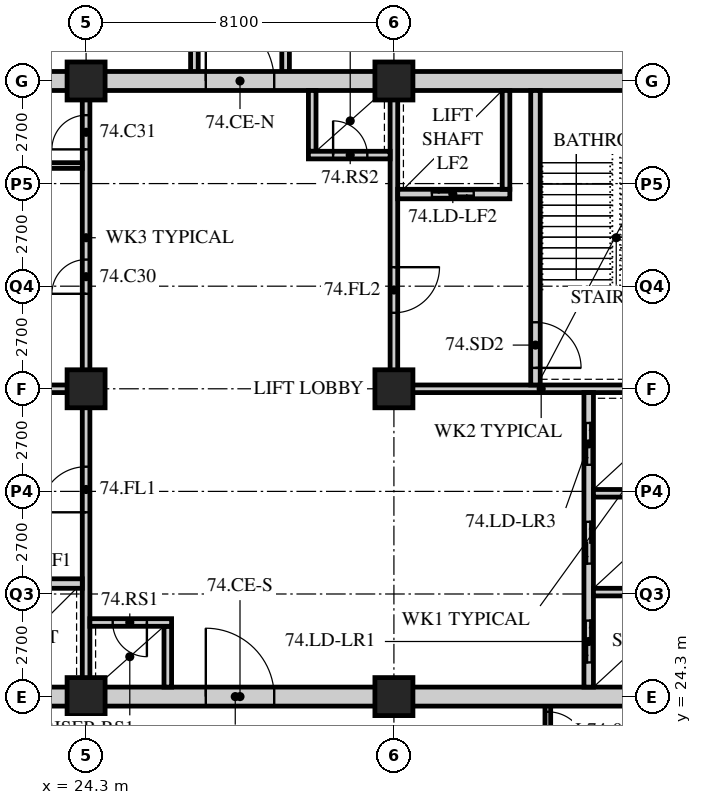
"""IFC4 building model, lengths in metres.
Left out: names, types, materials, properties, quantities, classifications, styles, units other than length and angle.
Written with IfcOpenShell. Run it as: python <this file> out.ifc"""

import sys

from ifc_helpers import new_model, si_unit, direction, frame, frame_2d, origin, origin_2d, place, context, subcontext, project, spatial, rectangle, hollow_rectangle, extrude, element, fill, save


model = new_model("IFC4")
c1 = context("Model", 3, precision=1e-05, world=origin(), true_north=direction((0.0, 1.0)))
c2 = subcontext(c1, "Body", "Model", "MODEL_VIEW")
j1 = project(units=[si_unit("LENGTHUNIT", "METRE"), si_unit("PLANEANGLEUNIT", "RADIAN")], contexts=[c1])
p1 = place(None, origin())
s1 = spatial("IfcSite", under=j1, at=p1, CompositionType="ELEMENT")
p2 = place(p1, origin())
s2 = spatial("IfcBuilding", under=s1, at=p2, CompositionType="ELEMENT")
p3 = place(p2, frame((0.0, 0.0, 289.2)))
s3 = spatial("IfcBuildingStorey", under=s2, at=p3, CompositionType="ELEMENT", Elevation=289.2)
for number, where, z_axis, x_axis in (
    (1, (24.3, 24.3, 0.0), (0.0, 0.0, 1.0), (1.0, 0.0, 0.0)),
    (2, (24.3, 32.4, 0.0), (0.0, 0.0, 1.0), (1.0, 0.0, 0.0)),
    (3, (24.3, 40.5, 0.0), (0.0, 0.0, 1.0), (1.0, 0.0, 0.0)),
    (4, (32.4, 24.3, 0.0), (0.0, 0.0, 1.0), (1.0, 0.0, 0.0)),
    (5, (32.4, 32.4, 0.0), (0.0, 0.0, 1.0), (1.0, 0.0, 0.0)),
    (6, (32.4, 40.5, 0.0), (0.0, 0.0, 1.0), (1.0, 0.0, 0.0)),
):
    element("IfcColumn", number, at=place(p3, frame(where, z_axis=z_axis, x_axis=x_axis)), inside=s3, PredefinedType="COLUMN", context=c2, shape_type="SweptSolid", body=[
        extrude(hollow_rectangle(XDim=1.0, YDim=1.0, WallThickness=0.1, at=origin_2d()), origin(), (0.0, 0.0, 1.0), 3.9),
    ])
for number, where, z_axis, x_axis in (
    (7, (27.15, 40.5, 0.0), (0.0, 0.0, 1.0), (0.0, 1.0, 0.0)),
    (8, (29.55, 40.5, 0.0), (0.0, 0.0, 1.0), (0.0, 1.0, 0.0)),
):
    element("IfcWall", number, at=place(p3, frame(where, z_axis=z_axis, x_axis=x_axis)), inside=s3, PredefinedType="SOLIDWALL", context=c2, shape_type="SweptSolid", body=[
        extrude(rectangle(XDim=6.3, YDim=0.2, at=frame_2d((3.15, 0.0))), origin(), (0.0, 0.0, 1.0), 3.69),
    ])
p4 = place(p3, frame((36.45, 22.5, 0.0), z_axis=(0.0, 0.0, 1.0), x_axis=(0.0, 1.0, 0.0)))
e9 = element("IfcWall", 9, at=p4, inside=s3, PredefinedType="PARTITIONING", context=c2, shape_type="SweptSolid", body=[
    extrude(rectangle(XDim=1.8, YDim=0.15, at=frame_2d((0.9, 0.0))), origin(), (0.0, 0.0, 1.0), 3.69),
])
p5 = place(p4, frame((0.4, 0.0, 0.0)))
e10 = element("IfcOpeningElement", 10, at=p5, cuts=e9, PredefinedType="OPENING", context=c2, shape_type="SweptSolid", body=[
    extrude(rectangle(XDim=1.0, YDim=2.1, at=frame_2d((0.5, 1.05))), frame((0.0, 0.085, 0.0), z_axis=(0.0, -1.0, 0.0), x_axis=(1.0, 0.0, 0.0)), (0.0, 0.0, 1.0), 0.17),
])
p6 = place(p3, frame((15.95, 24.3, 0.0), z_axis=(0.0, 0.0, 1.0), x_axis=(1.0, 0.0, 0.0)))
e11 = element("IfcWall", 11, at=p6, inside=s3, PredefinedType="SOLIDWALL", context=c2, shape_type="SweptSolid", body=[
    extrude(rectangle(XDim=24.55, YDim=0.5, at=frame_2d((12.275, 0.0))), origin(), (0.0, 0.0, 1.0), 3.04),
])
p7 = place(p6, frame((11.5, 0.0, 0.0)))
e12 = element("IfcOpeningElement", 12, at=p7, cuts=e11, PredefinedType="OPENING", context=c2, shape_type="SweptSolid", body=[
    extrude(rectangle(XDim=1.8, YDim=2.4, at=frame_2d((0.9, 1.2))), frame((0.0, 0.26, 0.0), z_axis=(0.0, -1.0, 0.0), x_axis=(1.0, 0.0, 0.0)), (0.0, 0.0, 1.0), 0.52),
])
p8 = place(p3, frame((15.95, 40.5, 0.0), z_axis=(0.0, 0.0, 1.0), x_axis=(1.0, 0.0, 0.0)))
e13 = element("IfcWall", 13, at=p8, inside=s3, PredefinedType="SOLIDWALL", context=c2, shape_type="SweptSolid", body=[
    extrude(rectangle(XDim=24.55, YDim=0.5, at=frame_2d((12.275, 0.0))), origin(), (0.0, 0.0, 1.0), 3.04),
])
p9 = place(p8, frame((11.5, 0.0, 0.0)))
e14 = element("IfcOpeningElement", 14, at=p9, cuts=e13, PredefinedType="OPENING", context=c2, shape_type="SweptSolid", body=[
    extrude(rectangle(XDim=1.8, YDim=2.4, at=frame_2d((0.9, 1.2))), frame((0.0, 0.26, 0.0), z_axis=(0.0, -1.0, 0.0), x_axis=(1.0, 0.0, 0.0)), (0.0, 0.0, 1.0), 0.52),
])
p10 = place(p3, frame((16.45, 32.4, 0.0), z_axis=(0.0, 0.0, 1.0), x_axis=(1.0, 0.0, 0.0)))
e15 = element("IfcWall", 15, at=p10, inside=s3, PredefinedType="SOLIDWALL", context=c2, shape_type="SweptSolid", body=[
    extrude(rectangle(XDim=7.95, YDim=0.2, at=frame_2d((3.975, 0.0))), origin(), (0.0, 0.0, 1.0), 3.078),
])
p11 = place(p3, frame((24.3, 24.55, 0.0), z_axis=(0.0, 0.0, 1.0), x_axis=(0.0, 1.0, 0.0)))
e16 = element("IfcWall", 16, at=p11, inside=s3, PredefinedType="SOLIDWALL", context=c2, shape_type="SweptSolid", body=[
    extrude(rectangle(XDim=7.75, YDim=0.2, at=frame_2d((3.875, 0.0))), origin(), (0.0, 0.0, 1.0), 3.078),
])
p12 = place(p11, frame((4.6, 0.0, 0.0)))
e17 = element("IfcOpeningElement", 17, at=p12, cuts=e16, PredefinedType="OPENING", context=c2, shape_type="SweptSolid", body=[
    extrude(rectangle(XDim=1.2, YDim=2.1, at=frame_2d((0.6, 1.05))), frame((0.0, 0.11, 0.0), z_axis=(0.0, -1.0, 0.0), x_axis=(1.0, 0.0, 0.0)), (0.0, 0.0, 1.0), 0.22),
])
p13 = place(p3, frame((21.25, 27.275, 0.0), z_axis=(0.0, 0.0, 1.0), x_axis=(1.0, 0.0, 0.0)))
e18 = element("IfcWall", 18, at=p13, inside=s3, PredefinedType="SOLIDWALL", context=c2, shape_type="SweptSolid", body=[
    extrude(rectangle(XDim=2.95, YDim=0.25, at=frame_2d((1.475, 0.0))), origin(), (0.0, 0.0, 1.0), 3.69),
])
p14 = place(p13, frame((0.95, 0.0, 0.0)))
e19 = element("IfcOpeningElement", 19, at=p14, cuts=e18, PredefinedType="OPENING", context=c2, shape_type="SweptSolid", body=[
    extrude(rectangle(XDim=1.1, YDim=2.4, at=frame_2d((0.55, 1.2))), frame((0.0, 0.135, 0.0), z_axis=(0.0, -1.0, 0.0), x_axis=(1.0, 0.0, 0.0)), (0.0, 0.0, 1.0), 0.27),
])
p15 = place(p3, frame((26.45, 24.55, 0.0), z_axis=(0.0, 0.0, 1.0), x_axis=(0.0, 1.0, 0.0)))
e20 = element("IfcWall", 20, at=p15, inside=s3, PredefinedType="SOLIDWALL", context=c2, shape_type="SweptSolid", body=[
    extrude(rectangle(XDim=1.6, YDim=0.2, at=frame_2d((0.8, 0.0))), origin(), (0.0, 0.0, 1.0), 3.69),
])
p16 = place(p3, frame((24.4, 26.25, 0.0), z_axis=(0.0, 0.0, 1.0), x_axis=(1.0, 0.0, 0.0)))
e21 = element("IfcWall", 21, at=p16, inside=s3, PredefinedType="SOLIDWALL", context=c2, shape_type="SweptSolid", body=[
    extrude(rectangle(XDim=2.15, YDim=0.2, at=frame_2d((1.075, 0.0))), origin(), (0.0, 0.0, 1.0), 3.69),
])
p17 = place(p16, frame((0.6, 0.0, 0.0)))
e22 = element("IfcOpeningElement", 22, at=p17, cuts=e21, PredefinedType="OPENING", context=c2, shape_type="SweptSolid", body=[
    extrude(rectangle(XDim=0.9, YDim=2.1, at=frame_2d((0.45, 1.05))), frame((0.0, 0.11, 0.0), z_axis=(0.0, -1.0, 0.0), x_axis=(1.0, 0.0, 0.0)), (0.0, 0.0, 1.0), 0.22),
])
p18 = place(p3, frame((32.3, 32.4, 0.0), z_axis=(0.0, 0.0, 1.0), x_axis=(1.0, 0.0, 0.0)))
e23 = element("IfcWall", 23, at=p18, inside=s3, PredefinedType="SOLIDWALL", context=c2, shape_type="SweptSolid", body=[
    extrude(rectangle(XDim=7.95, YDim=0.2, at=frame_2d((3.975, 0.0))), origin(), (0.0, 0.0, 1.0), 3.078),
])
p19 = place(p3, frame((32.4, 32.5, 0.0), z_axis=(0.0, 0.0, 1.0), x_axis=(0.0, 1.0, 0.0)))
e24 = element("IfcWall", 24, at=p19, inside=s3, PredefinedType="SOLIDWALL", context=c2, shape_type="SweptSolid", body=[
    extrude(rectangle(XDim=7.75, YDim=0.2, at=frame_2d((3.875, 0.0))), origin(), (0.0, 0.0, 1.0), 3.078),
])
p20 = place(p19, frame((1.9, 0.0, 0.0)))
e25 = element("IfcOpeningElement", 25, at=p20, cuts=e24, PredefinedType="OPENING", context=c2, shape_type="SweptSolid", body=[
    extrude(rectangle(XDim=1.2, YDim=2.1, at=frame_2d((0.6, 1.05))), frame((0.0, 0.11, 0.0), z_axis=(0.0, -1.0, 0.0), x_axis=(1.0, 0.0, 0.0)), (0.0, 0.0, 1.0), 0.22),
])
p21 = place(p3, frame((37.525, 24.55, 0.0), z_axis=(0.0, 0.0, 1.0), x_axis=(0.0, 1.0, 0.0)))
e26 = element("IfcWall", 26, at=p21, inside=s3, PredefinedType="SOLIDWALL", context=c2, shape_type="SweptSolid", body=[
    extrude(rectangle(XDim=7.75, YDim=0.25, at=frame_2d((3.875, 0.0))), origin(), (0.0, 0.0, 1.0), 3.69),
])
p22 = place(p21, frame((0.65, 0.0, 0.0)))
e27 = element("IfcOpeningElement", 27, at=p22, cuts=e26, PredefinedType="OPENING", context=c2, shape_type="SweptSolid", body=[
    extrude(rectangle(XDim=1.1, YDim=2.4, at=frame_2d((0.55, 1.2))), frame((0.0, 0.135, 0.0), z_axis=(0.0, -1.0, 0.0), x_axis=(1.0, 0.0, 0.0)), (0.0, 0.0, 1.0), 0.27),
])
p23 = place(p21, frame((3.25, 0.0, 0.0)))
e28 = element("IfcOpeningElement", 28, at=p23, cuts=e26, PredefinedType="OPENING", context=c2, shape_type="SweptSolid", body=[
    extrude(rectangle(XDim=1.1, YDim=2.4, at=frame_2d((0.55, 1.2))), frame((0.0, 0.135, 0.0), z_axis=(0.0, -1.0, 0.0), x_axis=(1.0, 0.0, 0.0)), (0.0, 0.0, 1.0), 0.27),
])
p24 = place(p21, frame((5.85, 0.0, 0.0)))
e29 = element("IfcOpeningElement", 29, at=p24, cuts=e26, PredefinedType="OPENING", context=c2, shape_type="SweptSolid", body=[
    extrude(rectangle(XDim=1.1, YDim=2.4, at=frame_2d((0.55, 1.2))), frame((0.0, 0.135, 0.0), z_axis=(0.0, -1.0, 0.0), x_axis=(1.0, 0.0, 0.0)), (0.0, 0.0, 1.0), 0.27),
])
for number, where, z_axis, x_axis in (
    (30, (37.65, 27.05, 0.0), (0.0, 0.0, 1.0), (1.0, 0.0, 0.0)),
    (31, (37.65, 29.65, 0.0), (0.0, 0.0, 1.0), (1.0, 0.0, 0.0)),
):
    element("IfcWall", number, at=place(p3, frame(where, z_axis=z_axis, x_axis=x_axis)), inside=s3, PredefinedType="SOLIDWALL", context=c2, shape_type="SweptSolid", body=[
        extrude(rectangle(XDim=2.6, YDim=0.2, at=frame_2d((1.3, 0.0))), origin(), (0.0, 0.0, 1.0), 3.69),
    ])
p25 = place(p3, frame((36.125, 32.5, 0.0), z_axis=(0.0, 0.0, 1.0), x_axis=(0.0, 1.0, 0.0)))
e32 = element("IfcWall", 32, at=p25, inside=s3, PredefinedType="SOLIDWALL", context=c2, shape_type="SweptSolid", body=[
    extrude(rectangle(XDim=7.75, YDim=0.25, at=frame_2d((3.875, 0.0))), origin(), (0.0, 0.0, 1.0), 3.69),
])
p26 = place(p25, frame((0.45, 0.0, 0.0)))
e33 = element("IfcOpeningElement", 33, at=p26, cuts=e32, PredefinedType="OPENING", context=c2, shape_type="SweptSolid", body=[
    extrude(rectangle(XDim=1.2, YDim=2.1, at=frame_2d((0.6, 1.05))), frame((0.0, 0.135, 0.0), z_axis=(0.0, -1.0, 0.0), x_axis=(1.0, 0.0, 0.0)), (0.0, 0.0, 1.0), 0.27),
])
p27 = place(p3, frame((32.5, 37.525, 0.0), z_axis=(0.0, 0.0, 1.0), x_axis=(1.0, 0.0, 0.0)))
e34 = element("IfcWall", 34, at=p27, inside=s3, PredefinedType="SOLIDWALL", context=c2, shape_type="SweptSolid", body=[
    extrude(rectangle(XDim=2.95, YDim=0.25, at=frame_2d((1.475, 0.0))), origin(), (0.0, 0.0, 1.0), 3.69),
])
p28 = place(p27, frame((0.9, 0.0, 0.0)))
e35 = element("IfcOpeningElement", 35, at=p28, cuts=e34, PredefinedType="OPENING", context=c2, shape_type="SweptSolid", body=[
    extrude(rectangle(XDim=1.1, YDim=2.4, at=frame_2d((0.55, 1.2))), frame((0.0, 0.135, 0.0), z_axis=(0.0, -1.0, 0.0), x_axis=(1.0, 0.0, 0.0)), (0.0, 0.0, 1.0), 0.27),
])
p29 = place(p3, frame((35.35, 37.65, 0.0), z_axis=(0.0, 0.0, 1.0), x_axis=(0.0, 1.0, 0.0)))
e36 = element("IfcWall", 36, at=p29, inside=s3, PredefinedType="SOLIDWALL", context=c2, shape_type="SweptSolid", body=[
    extrude(rectangle(XDim=2.6, YDim=0.2, at=frame_2d((1.3, 0.0))), origin(), (0.0, 0.0, 1.0), 3.69),
])
p30 = place(p3, frame((30.25, 38.65, 0.0), z_axis=(0.0, 0.0, 1.0), x_axis=(0.0, 1.0, 0.0)))
e37 = element("IfcWall", 37, at=p30, inside=s3, PredefinedType="SOLIDWALL", context=c2, shape_type="SweptSolid", body=[
    extrude(rectangle(XDim=1.6, YDim=0.2, at=frame_2d((0.8, 0.0))), origin(), (0.0, 0.0, 1.0), 3.69),
])
p31 = place(p3, frame((30.15, 38.55, 0.0), z_axis=(0.0, 0.0, 1.0), x_axis=(1.0, 0.0, 0.0)))
e38 = element("IfcWall", 38, at=p31, inside=s3, PredefinedType="SOLIDWALL", context=c2, shape_type="SweptSolid", body=[
    extrude(rectangle(XDim=2.15, YDim=0.2, at=frame_2d((1.075, 0.0))), origin(), (0.0, 0.0, 1.0), 3.69),
])
p32 = place(p31, frame((0.65, 0.0, 0.0)))
e39 = element("IfcOpeningElement", 39, at=p32, cuts=e38, PredefinedType="OPENING", context=c2, shape_type="SweptSolid", body=[
    extrude(rectangle(XDim=0.9, YDim=2.1, at=frame_2d((0.45, 1.05))), frame((0.0, 0.11, 0.0), z_axis=(0.0, -1.0, 0.0), x_axis=(1.0, 0.0, 0.0)), (0.0, 0.0, 1.0), 0.22),
])
p33 = place(p3, frame((24.3, 32.5, 0.0), z_axis=(0.0, 0.0, 1.0), x_axis=(0.0, 1.0, 0.0)))
e40 = element("IfcWall", 40, at=p33, inside=s3, PredefinedType="PARTITIONING", context=c2, shape_type="SweptSolid", body=[
    extrude(rectangle(XDim=7.75, YDim=0.2, at=frame_2d((3.875, 0.0))), origin(), (0.0, 0.0, 1.0), 3.078),
])
p34 = place(p33, frame((2.4, 0.0, 0.0)))
e41 = element("IfcOpeningElement", 41, at=p34, cuts=e40, PredefinedType="OPENING", context=c2, shape_type="SweptSolid", body=[
    extrude(rectangle(XDim=0.9, YDim=2.1, at=frame_2d((0.45, 1.05))), frame((0.0, 0.11, 0.0), z_axis=(0.0, -1.0, 0.0), x_axis=(1.0, 0.0, 0.0)), (0.0, 0.0, 1.0), 0.22),
])
p35 = place(p33, frame((6.2, 0.0, 0.0)))
e42 = element("IfcOpeningElement", 42, at=p35, cuts=e40, PredefinedType="OPENING", context=c2, shape_type="SweptSolid", body=[
    extrude(rectangle(XDim=0.9, YDim=2.1, at=frame_2d((0.45, 1.05))), frame((0.0, 0.11, 0.0), z_axis=(0.0, -1.0, 0.0), x_axis=(1.0, 0.0, 0.0)), (0.0, 0.0, 1.0), 0.22),
])
p36 = place(p3, frame((16.45, 38.275, 0.0), z_axis=(0.0, 0.0, 1.0), x_axis=(1.0, 0.0, 0.0)))
e43 = element("IfcWall", 43, at=p36, inside=s3, PredefinedType="PARTITIONING", context=c2, shape_type="SweptSolid", body=[
    extrude(rectangle(XDim=7.75, YDim=0.15, at=frame_2d((3.875, 0.0))), origin(), (0.0, 0.0, 1.0), 3.69),
])
p37 = place(p5, origin())
e44 = element("IfcDoor", 44, at=p37, inside=s3, OperationType="SINGLE_SWING_RIGHT", PredefinedType="DOOR", context=c2, shape_type="SweptSolid", body=[
    extrude(rectangle(XDim=1.0, YDim=2.1, at=frame_2d((0.5, 1.05))), frame((0.0, 0.025, 0.0), z_axis=(0.0, -1.0, 0.0), x_axis=(1.0, 0.0, 0.0)), (0.0, 0.0, 1.0), 0.05),
])
fill(e10, e44)
p38 = place(p34, origin())
e45 = element("IfcDoor", 45, at=p38, inside=s3, OperationType="SINGLE_SWING_LEFT", PredefinedType="DOOR", context=c2, shape_type="SweptSolid", body=[
    extrude(rectangle(XDim=0.9, YDim=2.1, at=frame_2d((0.45, 1.05))), frame((0.0, 0.025, 0.0), z_axis=(0.0, -1.0, 0.0), x_axis=(1.0, 0.0, 0.0)), (0.0, 0.0, 1.0), 0.05),
])
fill(e41, e45)
p39 = place(p35, origin())
e46 = element("IfcDoor", 46, at=p39, inside=s3, OperationType="SINGLE_SWING_LEFT", PredefinedType="DOOR", context=c2, shape_type="SweptSolid", body=[
    extrude(rectangle(XDim=0.9, YDim=2.1, at=frame_2d((0.45, 1.05))), frame((0.0, 0.025, 0.0), z_axis=(0.0, -1.0, 0.0), x_axis=(1.0, 0.0, 0.0)), (0.0, 0.0, 1.0), 0.05),
])
fill(e42, e46)
p40 = place(p12, origin())
e47 = element("IfcDoor", 47, at=p40, inside=s3, OperationType="SINGLE_SWING_LEFT", PredefinedType="DOOR", context=c2, shape_type="SweptSolid", body=[
    extrude(rectangle(XDim=1.2, YDim=2.1, at=frame_2d((0.6, 1.05))), frame((0.0, 0.025, 0.0), z_axis=(0.0, -1.0, 0.0), x_axis=(1.0, 0.0, 0.0)), (0.0, 0.0, 1.0), 0.05),
])
fill(e17, e47)
p41 = place(p17, origin())
e48 = element("IfcDoor", 48, at=p41, inside=s3, OperationType="SINGLE_SWING_LEFT", PredefinedType="DOOR", context=c2, shape_type="SweptSolid", body=[
    extrude(rectangle(XDim=0.9, YDim=2.1, at=frame_2d((0.45, 1.05))), frame((0.0, 0.025, 0.0), z_axis=(0.0, -1.0, 0.0), x_axis=(1.0, 0.0, 0.0)), (0.0, 0.0, 1.0), 0.05),
])
fill(e22, e48)
p42 = place(p26, origin())
e49 = element("IfcDoor", 49, at=p42, inside=s3, OperationType="SINGLE_SWING_RIGHT", PredefinedType="DOOR", context=c2, shape_type="SweptSolid", body=[
    extrude(rectangle(XDim=1.2, YDim=2.1, at=frame_2d((0.6, 1.05))), frame((0.0, 0.025, 0.0), z_axis=(0.0, -1.0, 0.0), x_axis=(1.0, 0.0, 0.0)), (0.0, 0.0, 1.0), 0.05),
])
fill(e33, e49)
p43 = place(p20, origin())
e50 = element("IfcDoor", 50, at=p43, inside=s3, OperationType="SINGLE_SWING_LEFT", PredefinedType="DOOR", context=c2, shape_type="SweptSolid", body=[
    extrude(rectangle(XDim=1.2, YDim=2.1, at=frame_2d((0.6, 1.05))), frame((0.0, 0.025, 0.0), z_axis=(0.0, -1.0, 0.0), x_axis=(1.0, 0.0, 0.0)), (0.0, 0.0, 1.0), 0.05),
])
fill(e25, e50)
p44 = place(p32, origin())
e51 = element("IfcDoor", 51, at=p44, inside=s3, OperationType="SINGLE_SWING_LEFT", PredefinedType="DOOR", context=c2, shape_type="SweptSolid", body=[
    extrude(rectangle(XDim=0.9, YDim=2.1, at=frame_2d((0.45, 1.05))), frame((0.0, 0.025, 0.0), z_axis=(0.0, -1.0, 0.0), x_axis=(1.0, 0.0, 0.0)), (0.0, 0.0, 1.0), 0.05),
])
fill(e39, e51)
p45 = place(p22, origin())
e52 = element("IfcDoor", 52, at=p45, inside=s3, OperationType="DOUBLE_DOOR_SLIDING", PredefinedType="DOOR", context=c2, shape_type="SweptSolid", body=[
    extrude(rectangle(XDim=1.1, YDim=2.4, at=frame_2d((0.55, 1.2))), frame((0.0, 0.025, 0.0), z_axis=(0.0, -1.0, 0.0), x_axis=(1.0, 0.0, 0.0)), (0.0, 0.0, 1.0), 0.05),
])
fill(e27, e52)
p46 = place(p23, origin())
e53 = element("IfcDoor", 53, at=p46, inside=s3, OperationType="DOUBLE_DOOR_SLIDING", PredefinedType="DOOR", context=c2, shape_type="SweptSolid", body=[
    extrude(rectangle(XDim=1.1, YDim=2.4, at=frame_2d((0.55, 1.2))), frame((0.0, 0.025, 0.0), z_axis=(0.0, -1.0, 0.0), x_axis=(1.0, 0.0, 0.0)), (0.0, 0.0, 1.0), 0.05),
])
fill(e28, e53)
p47 = place(p24, origin())
e54 = element("IfcDoor", 54, at=p47, inside=s3, OperationType="DOUBLE_DOOR_SLIDING", PredefinedType="DOOR", context=c2, shape_type="SweptSolid", body=[
    extrude(rectangle(XDim=1.1, YDim=2.4, at=frame_2d((0.55, 1.2))), frame((0.0, 0.025, 0.0), z_axis=(0.0, -1.0, 0.0), x_axis=(1.0, 0.0, 0.0)), (0.0, 0.0, 1.0), 0.05),
])
fill(e29, e54)
p48 = place(p28, origin())
e55 = element("IfcDoor", 55, at=p48, inside=s3, OperationType="DOUBLE_DOOR_SLIDING", PredefinedType="DOOR", context=c2, shape_type="SweptSolid", body=[
    extrude(rectangle(XDim=1.1, YDim=2.4, at=frame_2d((0.55, 1.2))), frame((0.0, 0.025, 0.0), z_axis=(0.0, -1.0, 0.0), x_axis=(1.0, 0.0, 0.0)), (0.0, 0.0, 1.0), 0.05),
])
fill(e35, e55)
p49 = place(p7, origin())
e56 = element("IfcDoor", 56, at=p49, inside=s3, OperationType="DOUBLE_DOOR_SINGLE_SWING", PredefinedType="DOOR", context=c2, shape_type="SweptSolid", body=[
    extrude(rectangle(XDim=1.8, YDim=2.4, at=frame_2d((0.9, 1.2))), frame((0.0, 0.025, 0.0), z_axis=(0.0, -1.0, 0.0), x_axis=(1.0, 0.0, 0.0)), (0.0, 0.0, 1.0), 0.05),
])
fill(e12, e56)
p50 = place(p9, origin())
e57 = element("IfcDoor", 57, at=p50, inside=s3, OperationType="DOUBLE_DOOR_SINGLE_SWING", PredefinedType="DOOR", context=c2, shape_type="SweptSolid", body=[
    extrude(rectangle(XDim=1.8, YDim=2.4, at=frame_2d((0.9, 1.2))), frame((0.0, 0.025, 0.0), z_axis=(0.0, -1.0, 0.0), x_axis=(1.0, 0.0, 0.0)), (0.0, 0.0, 1.0), 0.05),
])
fill(e14, e57)
save(model, sys.argv[1])
